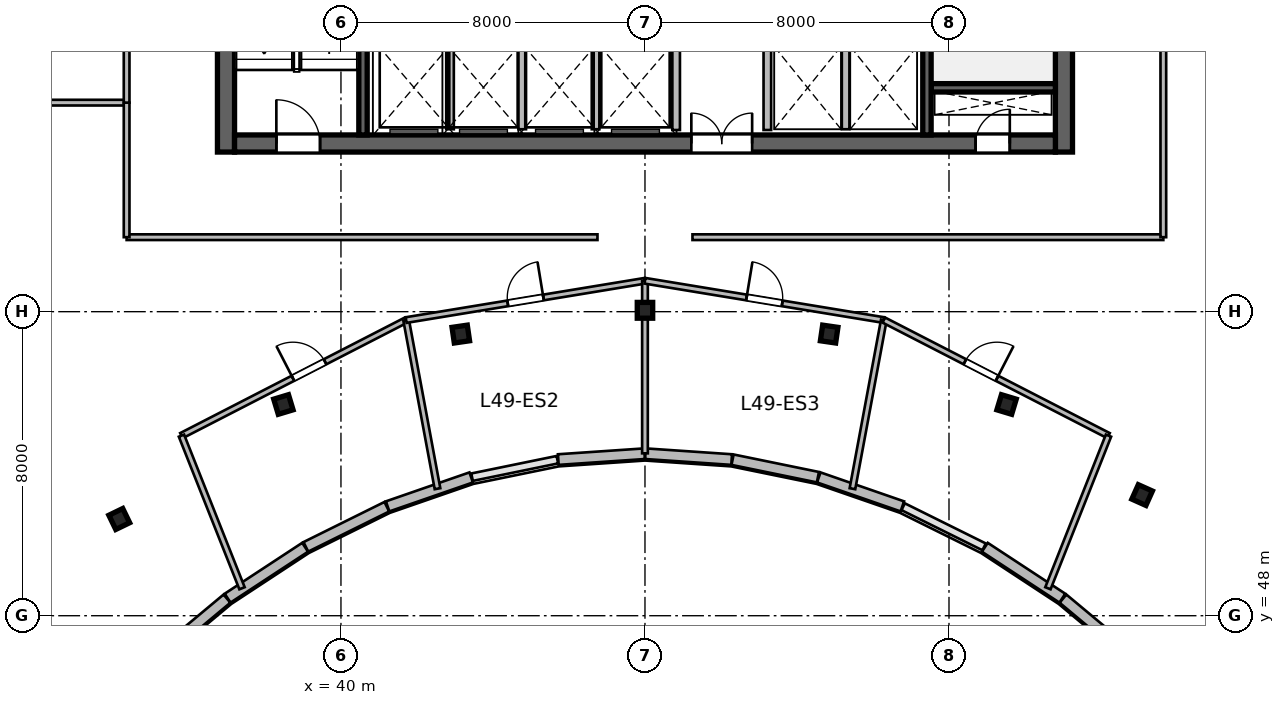
"""IFC4 building model, lengths in metres.
Left out: names, types, materials, properties, quantities, classifications, styles, units other than length and angle.
Written with IfcOpenShell. Run it as: python <this file> out.ifc"""

import sys

from ifc_helpers import new_model, si_unit, direction, frame, frame_2d, origin, origin_2d, place, context, subcontext, project, spatial, rectangle, i_section, extrude, source, transform, mapped, element, fill, save


model = new_model("IFC4")
c1 = context("Model", 3, precision=1e-05, world=origin(), true_north=direction((0.0, 1.0)))
c2 = subcontext(c1, "Body", "Model", "MODEL_VIEW")
j1 = project(units=[si_unit("LENGTHUNIT", "METRE"), si_unit("PLANEANGLEUNIT", "RADIAN")], contexts=[c1])
p1 = place(None, origin())
s1 = spatial("IfcSite", under=j1, at=p1, CompositionType="ELEMENT")
p2 = place(p1, origin())
s2 = spatial("IfcBuilding", under=s1, at=p2, CompositionType="ELEMENT")
p3 = place(p2, frame((0.0, 0.0, 204.0)))
s3 = spatial("IfcBuildingStorey", under=s2, at=p3, CompositionType="ELEMENT", Elevation=204.0)
m1 = source(origin(), c2, "Body", "SweptSolid", [
    extrude(rectangle(XDim=12.0, YDim=0.45, at=frame_2d((6.0, 0.0))), origin(), (0.0, 0.0, 1.0), 3.9),
])
for number, where, z_axis, x_axis in (
    (1, (36.975, 60.2, 0.0), (0.0, 0.0, 1.0), (0.0, 1.0, 0.0)),
    (2, (59.025, 60.2, 0.0), (0.0, 0.0, 1.0), (0.0, 1.0, 0.0)),
):
    element("IfcWall", number, at=place(p3, frame(where, z_axis=z_axis, x_axis=x_axis)), inside=s3, PredefinedType="SHEAR", context=c2, shape_type="MappedRepresentation", body=[
        mapped(m1, transform((0.0, 0.0, 0.0), scale=1.0)),
    ])
m2 = source(origin(), c2, "Body", "SweptSolid", [
    extrude(rectangle(XDim=21.6, YDim=0.45, at=frame_2d((10.8, 0.0))), origin(), (0.0, 0.0, 1.0), 3.9),
])
p4 = place(p3, frame((37.2, 60.425, 0.0), z_axis=(0.0, 0.0, 1.0), x_axis=(1.0, 0.0, 0.0)))
e3 = element("IfcWall", 3, at=p4, inside=s3, PredefinedType="SHEAR", context=c2, shape_type="MappedRepresentation", body=[
    mapped(m2, transform((0.0, 0.0, 0.0), scale=1.0)),
])
p5 = place(p4, frame((1.1, 0.0, 0.0)))
e4 = element("IfcOpeningElement", 4, at=p5, cuts=e3, PredefinedType="OPENING", context=c2, shape_type="SweptSolid", body=[
    extrude(rectangle(XDim=1.15, YDim=2.15, at=frame_2d((0.575, 1.075))), frame((0.0, 0.235, 0.0), z_axis=(0.0, -1.0, 0.0), x_axis=(1.0, 0.0, 0.0)), (0.0, 0.0, 1.0), 0.47),
])
p6 = place(p4, frame((19.5, 0.0, 0.0)))
e5 = element("IfcOpeningElement", 5, at=p6, cuts=e3, PredefinedType="OPENING", context=c2, shape_type="SweptSolid", body=[
    extrude(rectangle(XDim=0.9, YDim=2.1, at=frame_2d((0.45, 1.05))), frame((0.0, 0.235, 0.0), z_axis=(0.0, -1.0, 0.0), x_axis=(1.0, 0.0, 0.0)), (0.0, 0.0, 1.0), 0.47),
])
p7 = place(p4, frame((12.02, 0.0, 0.0)))
e6 = element("IfcOpeningElement", 6, at=p7, cuts=e3, PredefinedType="OPENING", context=c2, shape_type="SweptSolid", body=[
    extrude(rectangle(XDim=1.6, YDim=2.15, at=frame_2d((0.8, 1.075))), frame((0.0, 0.235, 0.0), z_axis=(0.0, -1.0, 0.0), x_axis=(1.0, 0.0, 0.0)), (0.0, 0.0, 1.0), 0.47),
])
m3 = source(origin(), c2, "Body", "SweptSolid", [
    extrude(rectangle(XDim=3.27, YDim=0.22, at=frame_2d((1.635, 0.0))), origin(), (0.0, 0.0, 1.0), 3.9),
])
p8 = place(p3, frame((55.53, 61.89, 0.0), z_axis=(0.0, 0.0, 1.0), x_axis=(1.0, 0.0, 0.0)))
e7 = element("IfcWall", 7, at=p8, inside=s3, PredefinedType="SHEAR", context=c2, shape_type="MappedRepresentation", body=[
    mapped(m3, transform((0.0, 0.0, 0.0), scale=1.0)),
])
m4 = source(origin(), c2, "Body", "SweptSolid", [
    extrude(rectangle(XDim=11.1, YDim=0.22, at=frame_2d((5.55, 0.0))), origin(), (0.0, 0.0, 1.0), 3.9),
])
p9 = place(p3, frame((40.58, 60.65, 0.0), z_axis=(0.0, 0.0, 1.0), x_axis=(0.0, 1.0, 0.0)))
e8 = element("IfcWall", 8, at=p9, inside=s3, PredefinedType="SHEAR", context=c2, shape_type="MappedRepresentation", body=[
    mapped(m4, transform((0.0, 0.0, 0.0), scale=1.0)),
])
p10 = place(p3, frame((55.42, 60.65, 0.0), z_axis=(0.0, 0.0, 1.0), x_axis=(0.0, 1.0, 0.0)))
e9 = element("IfcWall", 9, at=p10, inside=s3, PredefinedType="SHEAR", context=c2, shape_type="MappedRepresentation", body=[
    mapped(m4, transform((0.0, 0.0, 0.0), scale=1.0)),
])
p11 = place(p10, frame((9.595, 0.0, 0.0)))
e10 = element("IfcOpeningElement", 10, at=p11, cuts=e9, PredefinedType="OPENING", context=c2, shape_type="SweptSolid", body=[
    extrude(rectangle(XDim=1.15, YDim=2.15, at=frame_2d((0.575, 1.075))), frame((0.0, 0.12, 0.0), z_axis=(0.0, -1.0, 0.0), x_axis=(1.0, 0.0, 0.0)), (0.0, 0.0, 1.0), 0.24),
])
m5 = source(origin(), c2, "Body", "SweptSolid", [
    extrude(i_section(OverallWidth=0.406, OverallDepth=0.416, WebThickness=0.03, FlangeThickness=0.048, at=origin_2d()), origin(), (0.0, 0.0, 1.0), 3.9),
])
for number, where, z_axis, x_axis in (
    (11, (34.166, 50.545, 0.0), (0.0, 0.0, 1.0), (-0.436, 0.9, 0.0)),
    (12, (38.485, 53.558, 0.0), (0.0, 0.0, 1.0), (-0.289, 0.957, 0.0)),
    (13, (43.154, 55.411, 0.0), (0.0, 0.0, 1.0), (-0.143, 0.99, 0.0)),
    (14, (48.0, 56.036, 0.0), (0.0, 0.0, 1.0), (0.0, 1.0, 0.0)),
    (15, (52.846, 55.411, 0.0), (0.0, 0.0, 1.0), (0.143, 0.99, 0.0)),
    (16, (57.515, 53.558, 0.0), (0.0, 0.0, 1.0), (0.289, 0.957, 0.0)),
    (17, (61.082, 51.175, 0.0), (0.0, 0.0, 1.0), (0.409, 0.912, 0.0)),
):
    element("IfcColumn", number, at=place(p3, frame(where, z_axis=z_axis, x_axis=x_axis)), inside=s3, PredefinedType="COLUMN", context=c2, shape_type="MappedRepresentation", body=[
        mapped(m5, transform((0.0, 0.0, 0.0), scale=1.0)),
    ])
m6 = source(origin(), c2, "Body", "SweptSolid", [
    extrude(rectangle(XDim=2.511, YDim=0.28, at=frame_2d((1.256, 0.0))), origin(), (0.0, 0.0, 1.0), 3.64),
])
p12 = place(p3, frame((60.928, 46.841, 0.0), z_axis=(0.0, 0.0, 1.0), x_axis=(-0.767910416122, 0.640557251782, 0.0)))
e18 = element("IfcWall", 18, at=p12, inside=s3, PredefinedType="SOLIDWALL", context=c2, shape_type="MappedRepresentation", body=[
    mapped(m6, transform((0.0, 0.0, 0.0), scale=1.0)),
])
m7 = source(origin(), c2, "Body", "SweptSolid", [
    extrude(rectangle(XDim=2.44, YDim=0.28, at=frame_2d((1.22, 0.0))), origin(), (0.0, 0.0, 1.0), 3.64),
])
p13 = place(p3, frame((58.983, 48.462, 0.0), z_axis=(0.0, 0.0, 1.0), x_axis=(-0.83598480459, 0.548752591333, 0.0)))
e19 = element("IfcWall", 19, at=p13, inside=s3, PredefinedType="SOLIDWALL", context=c2, shape_type="MappedRepresentation", body=[
    mapped(m7, transform((0.0, 0.0, 0.0), scale=1.0)),
])
m8 = source(origin(), c2, "Body", "SweptSolid", [
    extrude(rectangle(XDim=2.328, YDim=0.28, at=frame_2d((1.164, 0.0))), origin(), (0.0, 0.0, 1.0), 3.64),
])
p14 = place(p3, frame((54.772, 50.876, 0.0), z_axis=(0.0, 0.0, 1.0), x_axis=(-0.944872545641, 0.32743834915, 0.0)))
e20 = element("IfcWall", 20, at=p14, inside=s3, PredefinedType="SOLIDWALL", context=c2, shape_type="MappedRepresentation", body=[
    mapped(m8, transform((0.0, 0.0, 0.0), scale=1.0)),
])
m9 = source(origin(), c2, "Body", "SweptSolid", [
    extrude(rectangle(XDim=2.292, YDim=0.28, at=frame_2d((1.146, 0.0))), origin(), (0.0, 0.0, 1.0), 3.64),
])
p15 = place(p3, frame((52.55, 51.645, 0.0), z_axis=(0.0, 0.0, 1.0), x_axis=(-0.979635482689, 0.200784264963, 0.0)))
e21 = element("IfcWall", 21, at=p15, inside=s3, PredefinedType="SOLIDWALL", context=c2, shape_type="MappedRepresentation", body=[
    mapped(m9, transform((0.0, 0.0, 0.0), scale=1.0)),
])
m10 = source(origin(), c2, "Body", "SweptSolid", [
    extrude(rectangle(XDim=2.274, YDim=0.28, at=frame_2d((1.137, 0.0))), origin(), (0.0, 0.0, 1.0), 3.64),
])
for number, where, z_axis, x_axis in (
    (22, (50.281, 52.109, 0.0), (0.0, 0.0, 1.0), (-0.998, 0.068, 0.0)),
    (23, (47.988, 52.263, 0.0), (0.0, 0.0, 1.0), (-0.998, -0.068, 0.0)),
):
    element("IfcWall", number, at=place(p3, frame(where, z_axis=z_axis, x_axis=x_axis)), inside=s3, PredefinedType="SOLIDWALL", context=c2, shape_type="MappedRepresentation", body=[
        mapped(m10, transform((0.0, 0.0, 0.0), scale=1.0)),
    ])
p16 = place(p3, frame((43.427, 51.639, 0.0), z_axis=(0.0, 0.0, 1.0), x_axis=(-0.944872545641, -0.32743834915, 0.0)))
e24 = element("IfcWall", 24, at=p16, inside=s3, PredefinedType="SOLIDWALL", context=c2, shape_type="MappedRepresentation", body=[
    mapped(m8, transform((0.0, 0.0, 0.0), scale=1.0)),
])
m11 = source(origin(), c2, "Body", "SweptSolid", [
    extrude(rectangle(XDim=2.378, YDim=0.28, at=frame_2d((1.189, 0.0))), origin(), (0.0, 0.0, 1.0), 3.64),
])
p17 = place(p3, frame((41.207, 50.868, 0.0), z_axis=(0.0, 0.0, 1.0), x_axis=(-0.895941616831, -0.444171835252, 0.0)))
e25 = element("IfcWall", 25, at=p17, inside=s3, PredefinedType="SOLIDWALL", context=c2, shape_type="MappedRepresentation", body=[
    mapped(m11, transform((0.0, 0.0, 0.0), scale=1.0)),
])
p18 = place(p3, frame((39.057, 49.801, 0.0), z_axis=(0.0, 0.0, 1.0), x_axis=(-0.83598480459, -0.548752591333, 0.0)))
e26 = element("IfcWall", 26, at=p18, inside=s3, PredefinedType="SOLIDWALL", context=c2, shape_type="MappedRepresentation", body=[
    mapped(m7, transform((0.0, 0.0, 0.0), scale=1.0)),
])
p19 = place(p3, frame((37.001, 48.449, 0.0), z_axis=(0.0, 0.0, 1.0), x_axis=(-0.767910416122, -0.640557251782, 0.0)))
e27 = element("IfcWall", 27, at=p19, inside=s3, PredefinedType="SOLIDWALL", context=c2, shape_type="MappedRepresentation", body=[
    mapped(m6, transform((0.0, 0.0, 0.0), scale=1.0)),
])
m12 = source(origin(), c2, "Body", "SweptSolid", [
    extrude(rectangle(XDim=2.24, YDim=0.2, at=frame_2d((1.12, 0.0))), origin(), (0.0, 0.0, 1.0), 3.64),
])
for number, where, z_axis, x_axis in (
    (28, (48.82, 60.78, 0.0), (0.0, 0.0, 1.0), (0.0, 1.0, 0.0)),
    (29, (51.22, 60.78, 0.0), (0.0, 0.0, 1.0), (0.0, 1.0, 0.0)),
):
    element("IfcWall", number, at=place(p3, frame(where, z_axis=z_axis, x_axis=x_axis)), inside=s3, PredefinedType="SOLIDWALL", context=c2, shape_type="MappedRepresentation", body=[
        mapped(m12, transform((0.0, 0.0, 0.0), scale=1.0)),
    ])
m13 = source(origin(), c2, "Body", "SweptSolid", [
    extrude(rectangle(XDim=2.2, YDim=0.2, at=frame_2d((1.1, 0.0))), origin(), (0.0, 0.0, 1.0), 3.64),
])
for number, where, z_axis, x_axis in (
    (30, (42.87, 60.8, 0.0), (0.0, 0.0, 1.0), (0.0, 1.0, 0.0)),
    (31, (44.77, 60.8, 0.0), (0.0, 0.0, 1.0), (0.0, 1.0, 0.0)),
    (32, (46.7, 60.8, 0.0), (0.0, 0.0, 1.0), (0.0, 1.0, 0.0)),
    (33, (53.28, 60.8, 0.0), (0.0, 0.0, 1.0), (0.0, 1.0, 0.0)),
):
    element("IfcWall", number, at=place(p3, frame(where, z_axis=z_axis, x_axis=x_axis)), inside=s3, PredefinedType="SOLIDWALL", context=c2, shape_type="MappedRepresentation", body=[
        mapped(m13, transform((0.0, 0.0, 0.0), scale=1.0)),
    ])
m14 = source(origin(), c2, "Body", "SweptSolid", [
    extrude(rectangle(XDim=6.648, YDim=0.15, at=frame_2d((3.324, 0.0))), origin(), (0.0, 0.0, 1.0), 3.64),
])
p20 = place(p3, frame((35.803, 52.738, 0.0), z_axis=(0.0, 0.0, 1.0), x_axis=(0.889264330224, 0.457393649925, 0.0)))
e34 = element("IfcWall", 34, at=p20, inside=s3, PredefinedType="PARTITIONING", context=c2, shape_type="MappedRepresentation", body=[
    mapped(m14, transform((0.0, 0.0, 0.0), scale=1.0)),
])
p21 = place(p20, frame((3.299, 0.0, 0.0)))
e35 = element("IfcOpeningElement", 35, at=p21, cuts=e34, PredefinedType="OPENING", context=c2, shape_type="SweptSolid", body=[
    extrude(rectangle(XDim=0.95, YDim=2.1, at=frame_2d((0.475, 1.05))), frame((0.0, 0.085, 0.0), z_axis=(0.0, -1.0, 0.0), x_axis=(1.0, 0.0, 0.0)), (0.0, 0.0, 1.0), 0.17),
])
m15 = source(origin(), c2, "Body", "SweptSolid", [
    extrude(rectangle(XDim=4.32, YDim=0.15, at=frame_2d((2.16, 0.0))), origin(), (0.0, 0.0, 1.0), 3.64),
])
p22 = place(p3, frame((37.396, 48.723, 0.0), z_axis=(0.0, 0.0, 1.0), x_axis=(-0.368846295269, 0.929490403644, 0.0)))
e36 = element("IfcWall", 36, at=p22, inside=s3, PredefinedType="PARTITIONING", context=c2, shape_type="MappedRepresentation", body=[
    mapped(m15, transform((0.0, 0.0, 0.0), scale=1.0)),
])
m16 = source(origin(), c2, "Body", "SweptSolid", [
    extrude(rectangle(XDim=4.513, YDim=0.15, at=frame_2d((2.257, 0.0))), origin(), (0.0, 0.0, 1.0), 3.64),
])
p23 = place(p3, frame((42.541, 51.342, 0.0), z_axis=(0.0, 0.0, 1.0), x_axis=(-0.182949257828, 0.983122357115, 0.0)))
e37 = element("IfcWall", 37, at=p23, inside=s3, PredefinedType="PARTITIONING", context=c2, shape_type="MappedRepresentation", body=[
    mapped(m16, transform((0.0, 0.0, 0.0), scale=1.0)),
])
m17 = source(origin(), c2, "Body", "SweptSolid", [
    extrude(rectangle(XDim=6.37, YDim=0.15, at=frame_2d((3.185, 0.0))), origin(), (0.0, 0.0, 1.0), 3.64),
])
p24 = place(p3, frame((41.715, 55.779, 0.0), z_axis=(0.0, 0.0, 1.0), x_axis=(0.986731594983, 0.162359968783, 0.0)))
e38 = element("IfcWall", 38, at=p24, inside=s3, PredefinedType="PARTITIONING", context=c2, shape_type="MappedRepresentation", body=[
    mapped(m17, transform((0.0, 0.0, 0.0), scale=1.0)),
])
p25 = place(p24, frame((2.71, 0.0, 0.0)))
e39 = element("IfcOpeningElement", 39, at=p25, cuts=e38, PredefinedType="OPENING", context=c2, shape_type="SweptSolid", body=[
    extrude(rectangle(XDim=0.95, YDim=2.1, at=frame_2d((0.475, 1.05))), frame((0.0, 0.085, 0.0), z_axis=(0.0, -1.0, 0.0), x_axis=(1.0, 0.0, 0.0)), (0.0, 0.0, 1.0), 0.17),
])
m18 = source(origin(), c2, "Body", "SweptSolid", [
    extrude(rectangle(XDim=4.541, YDim=0.15, at=frame_2d((2.27, 0.0))), origin(), (0.0, 0.0, 1.0), 3.085),
])
p26 = place(p3, frame((48.0, 52.273, 0.0), z_axis=(0.0, 0.0, 1.0), x_axis=(0.0, 1.0, 0.0)))
e40 = element("IfcWall", 40, at=p26, inside=s3, PredefinedType="PARTITIONING", context=c2, shape_type="MappedRepresentation", body=[
    mapped(m18, transform((0.0, 0.0, 0.0), scale=1.0)),
])
p27 = place(p3, frame((48.0, 56.813, 0.0), z_axis=(0.0, 0.0, 1.0), x_axis=(0.986731594983, -0.162359968783, 0.0)))
e41 = element("IfcWall", 41, at=p27, inside=s3, PredefinedType="PARTITIONING", context=c2, shape_type="MappedRepresentation", body=[
    mapped(m17, transform((0.0, 0.0, 0.0), scale=1.0)),
])
p28 = place(p27, frame((2.71, 0.0, 0.0)))
e42 = element("IfcOpeningElement", 42, at=p28, cuts=e41, PredefinedType="OPENING", context=c2, shape_type="SweptSolid", body=[
    extrude(rectangle(XDim=0.95, YDim=2.1, at=frame_2d((0.475, 1.05))), frame((0.0, 0.085, 0.0), z_axis=(0.0, -1.0, 0.0), x_axis=(1.0, 0.0, 0.0)), (0.0, 0.0, 1.0), 0.17),
])
p29 = place(p3, frame((53.459, 51.342, 0.0), z_axis=(0.0, 0.0, 1.0), x_axis=(0.182949257828, 0.983122357115, 0.0)))
e43 = element("IfcWall", 43, at=p29, inside=s3, PredefinedType="PARTITIONING", context=c2, shape_type="MappedRepresentation", body=[
    mapped(m16, transform((0.0, 0.0, 0.0), scale=1.0)),
])
p30 = place(p3, frame((54.285, 55.779, 0.0), z_axis=(0.0, 0.0, 1.0), x_axis=(0.889264330224, -0.457393649925, 0.0)))
e44 = element("IfcWall", 44, at=p30, inside=s3, PredefinedType="PARTITIONING", context=c2, shape_type="MappedRepresentation", body=[
    mapped(m14, transform((0.0, 0.0, 0.0), scale=1.0)),
])
p31 = place(p30, frame((2.399, 0.0, 0.0)))
e45 = element("IfcOpeningElement", 45, at=p31, cuts=e44, PredefinedType="OPENING", context=c2, shape_type="SweptSolid", body=[
    extrude(rectangle(XDim=0.95, YDim=2.1, at=frame_2d((0.475, 1.05))), frame((0.0, 0.085, 0.0), z_axis=(0.0, -1.0, 0.0), x_axis=(1.0, 0.0, 0.0)), (0.0, 0.0, 1.0), 0.17),
])
p32 = place(p3, frame((58.604, 48.723, 0.0), z_axis=(0.0, 0.0, 1.0), x_axis=(0.368846295269, 0.929490403644, 0.0)))
e46 = element("IfcWall", 46, at=p32, inside=s3, PredefinedType="PARTITIONING", context=c2, shape_type="MappedRepresentation", body=[
    mapped(m15, transform((0.0, 0.0, 0.0), scale=1.0)),
])
m19 = source(origin(), c2, "Body", "SweptSolid", [
    extrude(rectangle(XDim=12.39, YDim=0.15, at=frame_2d((6.195, 0.0))), origin(), (0.0, 0.0, 1.0), 3.64),
])
for number, where, z_axis, x_axis in (
    (47, (34.36, 57.96, 0.0), (0.0, 0.0, 1.0), (1.0, 0.0, 0.0)),
    (48, (49.25, 57.96, 0.0), (0.0, 0.0, 1.0), (1.0, 0.0, 0.0)),
):
    element("IfcWall", number, at=place(p3, frame(where, z_axis=z_axis, x_axis=x_axis)), inside=s3, PredefinedType="PARTITIONING", context=c2, shape_type="MappedRepresentation", body=[
        mapped(m19, transform((0.0, 0.0, 0.0), scale=1.0)),
    ])
m20 = source(origin(), c2, "Body", "SweptSolid", [
    extrude(rectangle(XDim=18.15, YDim=0.15, at=frame_2d((9.075, 0.0))), origin(), (0.0, 0.0, 1.0), 3.64),
])
p33 = place(p3, frame((16.21, 61.5, 0.0), z_axis=(0.0, 0.0, 1.0), x_axis=(1.0, 0.0, 0.0)))
e49 = element("IfcWall", 49, at=p33, inside=s3, PredefinedType="PARTITIONING", context=c2, shape_type="MappedRepresentation", body=[
    mapped(m20, transform((0.0, 0.0, 0.0), scale=1.0)),
])
m21 = source(origin(), c2, "Body", "SweptSolid", [
    extrude(rectangle(XDim=3.54, YDim=0.15, at=frame_2d((1.77, 0.0))), origin(), (0.0, 0.0, 1.0), 3.64),
])
p34 = place(p3, frame((34.36, 57.96, 0.0), z_axis=(0.0, 0.0, 1.0), x_axis=(0.0, 1.0, 0.0)))
e50 = element("IfcWall", 50, at=p34, inside=s3, PredefinedType="PARTITIONING", context=c2, shape_type="MappedRepresentation", body=[
    mapped(m21, transform((0.0, 0.0, 0.0), scale=1.0)),
])
m22 = source(origin(), c2, "Body", "SweptSolid", [
    extrude(rectangle(XDim=4.7, YDim=0.15, at=frame_2d((2.35, 0.0))), origin(), (0.0, 0.0, 1.0), 3.64),
])
p35 = place(p3, frame((34.36, 61.5, 0.0), z_axis=(0.0, 0.0, 1.0), x_axis=(0.0, 1.0, 0.0)))
e51 = element("IfcWall", 51, at=p35, inside=s3, PredefinedType="PARTITIONING", context=c2, shape_type="MappedRepresentation", body=[
    mapped(m22, transform((0.0, 0.0, 0.0), scale=1.0)),
])
p36 = place(p35, frame((1.875, 0.0, 0.0)))
e52 = element("IfcOpeningElement", 52, at=p36, cuts=e51, PredefinedType="OPENING", context=c2, shape_type="SweptSolid", body=[
    extrude(rectangle(XDim=0.95, YDim=2.1, at=frame_2d((0.475, 1.05))), frame((0.0, 0.085, 0.0), z_axis=(0.0, -1.0, 0.0), x_axis=(1.0, 0.0, 0.0)), (0.0, 0.0, 1.0), 0.17),
])
m23 = source(origin(), c2, "Body", "SweptSolid", [
    extrude(rectangle(XDim=19.209, YDim=0.15, at=frame_2d((9.604, 0.0))), origin(), (0.0, 0.0, 1.0), 3.64),
])
p37 = place(p3, frame((61.64, 57.96, 0.0), z_axis=(0.0, 0.0, 1.0), x_axis=(0.0, 1.0, 0.0)))
e53 = element("IfcWall", 53, at=p37, inside=s3, PredefinedType="PARTITIONING", context=c2, shape_type="MappedRepresentation", body=[
    mapped(m23, transform((0.0, 0.0, 0.0), scale=1.0)),
])
p38 = place(p37, frame((6.824, 0.0, 0.0)))
e54 = element("IfcOpeningElement", 54, at=p38, cuts=e53, PredefinedType="OPENING", context=c2, shape_type="SweptSolid", body=[
    extrude(rectangle(XDim=0.95, YDim=2.1, at=frame_2d((0.475, 1.05))), frame((0.0, 0.085, 0.0), z_axis=(0.0, -1.0, 0.0), x_axis=(1.0, 0.0, 0.0)), (0.0, 0.0, 1.0), 0.17),
])
m24 = source(origin(), c2, "Body", "SweptSolid", [
    extrude(rectangle(XDim=1.15, YDim=2.15, at=frame_2d((0.575, 1.075))), frame((0.0, 0.025, 0.0), z_axis=(0.0, -1.0, 0.0), x_axis=(1.0, 0.0, 0.0)), (0.0, 0.0, 1.0), 0.05),
])
p39 = place(p5, origin())
e55 = element("IfcDoor", 55, at=p39, inside=s3, OperationType="SINGLE_SWING_LEFT", PredefinedType="DOOR", context=c2, shape_type="MappedRepresentation", body=[
    mapped(m24, transform((0.0, 0.0, 0.0), scale=1.0)),
])
fill(e4, e55)
m25 = source(origin(), c2, "Body", "SweptSolid", [
    extrude(rectangle(XDim=0.9, YDim=2.1, at=frame_2d((0.45, 1.05))), frame((0.0, 0.025, 0.0), z_axis=(0.0, -1.0, 0.0), x_axis=(1.0, 0.0, 0.0)), (0.0, 0.0, 1.0), 0.05),
])
p40 = place(p6, origin())
e56 = element("IfcDoor", 56, at=p40, inside=s3, OperationType="SINGLE_SWING_RIGHT", PredefinedType="DOOR", context=c2, shape_type="MappedRepresentation", body=[
    mapped(m25, transform((0.0, 0.0, 0.0), scale=1.0)),
])
fill(e5, e56)
m26 = source(origin(), c2, "Body", "SweptSolid", [
    extrude(rectangle(XDim=1.6, YDim=2.15, at=frame_2d((0.8, 1.075))), frame((0.0, 0.025, 0.0), z_axis=(0.0, -1.0, 0.0), x_axis=(1.0, 0.0, 0.0)), (0.0, 0.0, 1.0), 0.05),
])
p41 = place(p7, origin())
e57 = element("IfcDoor", 57, at=p41, inside=s3, OperationType="DOUBLE_DOOR_SINGLE_SWING", PredefinedType="DOOR", context=c2, shape_type="MappedRepresentation", body=[
    mapped(m26, transform((0.0, 0.0, 0.0), scale=1.0)),
])
fill(e6, e57)
m27 = source(origin(), c2, "Body", "SweptSolid", [
    extrude(rectangle(XDim=0.95, YDim=2.1, at=frame_2d((0.475, 1.05))), frame((0.0, 0.025, 0.0), z_axis=(0.0, -1.0, 0.0), x_axis=(1.0, 0.0, 0.0)), (0.0, 0.0, 1.0), 0.05),
])
p42 = place(p21, origin())
e58 = element("IfcDoor", 58, at=p42, inside=s3, OperationType="SINGLE_SWING_LEFT", PredefinedType="DOOR", context=c2, shape_type="MappedRepresentation", body=[
    mapped(m27, transform((0.0, 0.0, 0.0), scale=1.0)),
])
fill(e35, e58)
p43 = place(p25, origin())
e59 = element("IfcDoor", 59, at=p43, inside=s3, OperationType="SINGLE_SWING_RIGHT", PredefinedType="DOOR", context=c2, shape_type="MappedRepresentation", body=[
    mapped(m27, transform((0.0, 0.0, 0.0), scale=1.0)),
])
fill(e39, e59)
p44 = place(p28, origin())
e60 = element("IfcDoor", 60, at=p44, inside=s3, OperationType="SINGLE_SWING_LEFT", PredefinedType="DOOR", context=c2, shape_type="MappedRepresentation", body=[
    mapped(m27, transform((0.0, 0.0, 0.0), scale=1.0)),
])
fill(e42, e60)
p45 = place(p31, origin())
e61 = element("IfcDoor", 61, at=p45, inside=s3, OperationType="SINGLE_SWING_RIGHT", PredefinedType="DOOR", context=c2, shape_type="MappedRepresentation", body=[
    mapped(m27, transform((0.0, 0.0, 0.0), scale=1.0)),
])
fill(e45, e61)
save(model, sys.argv[1])
